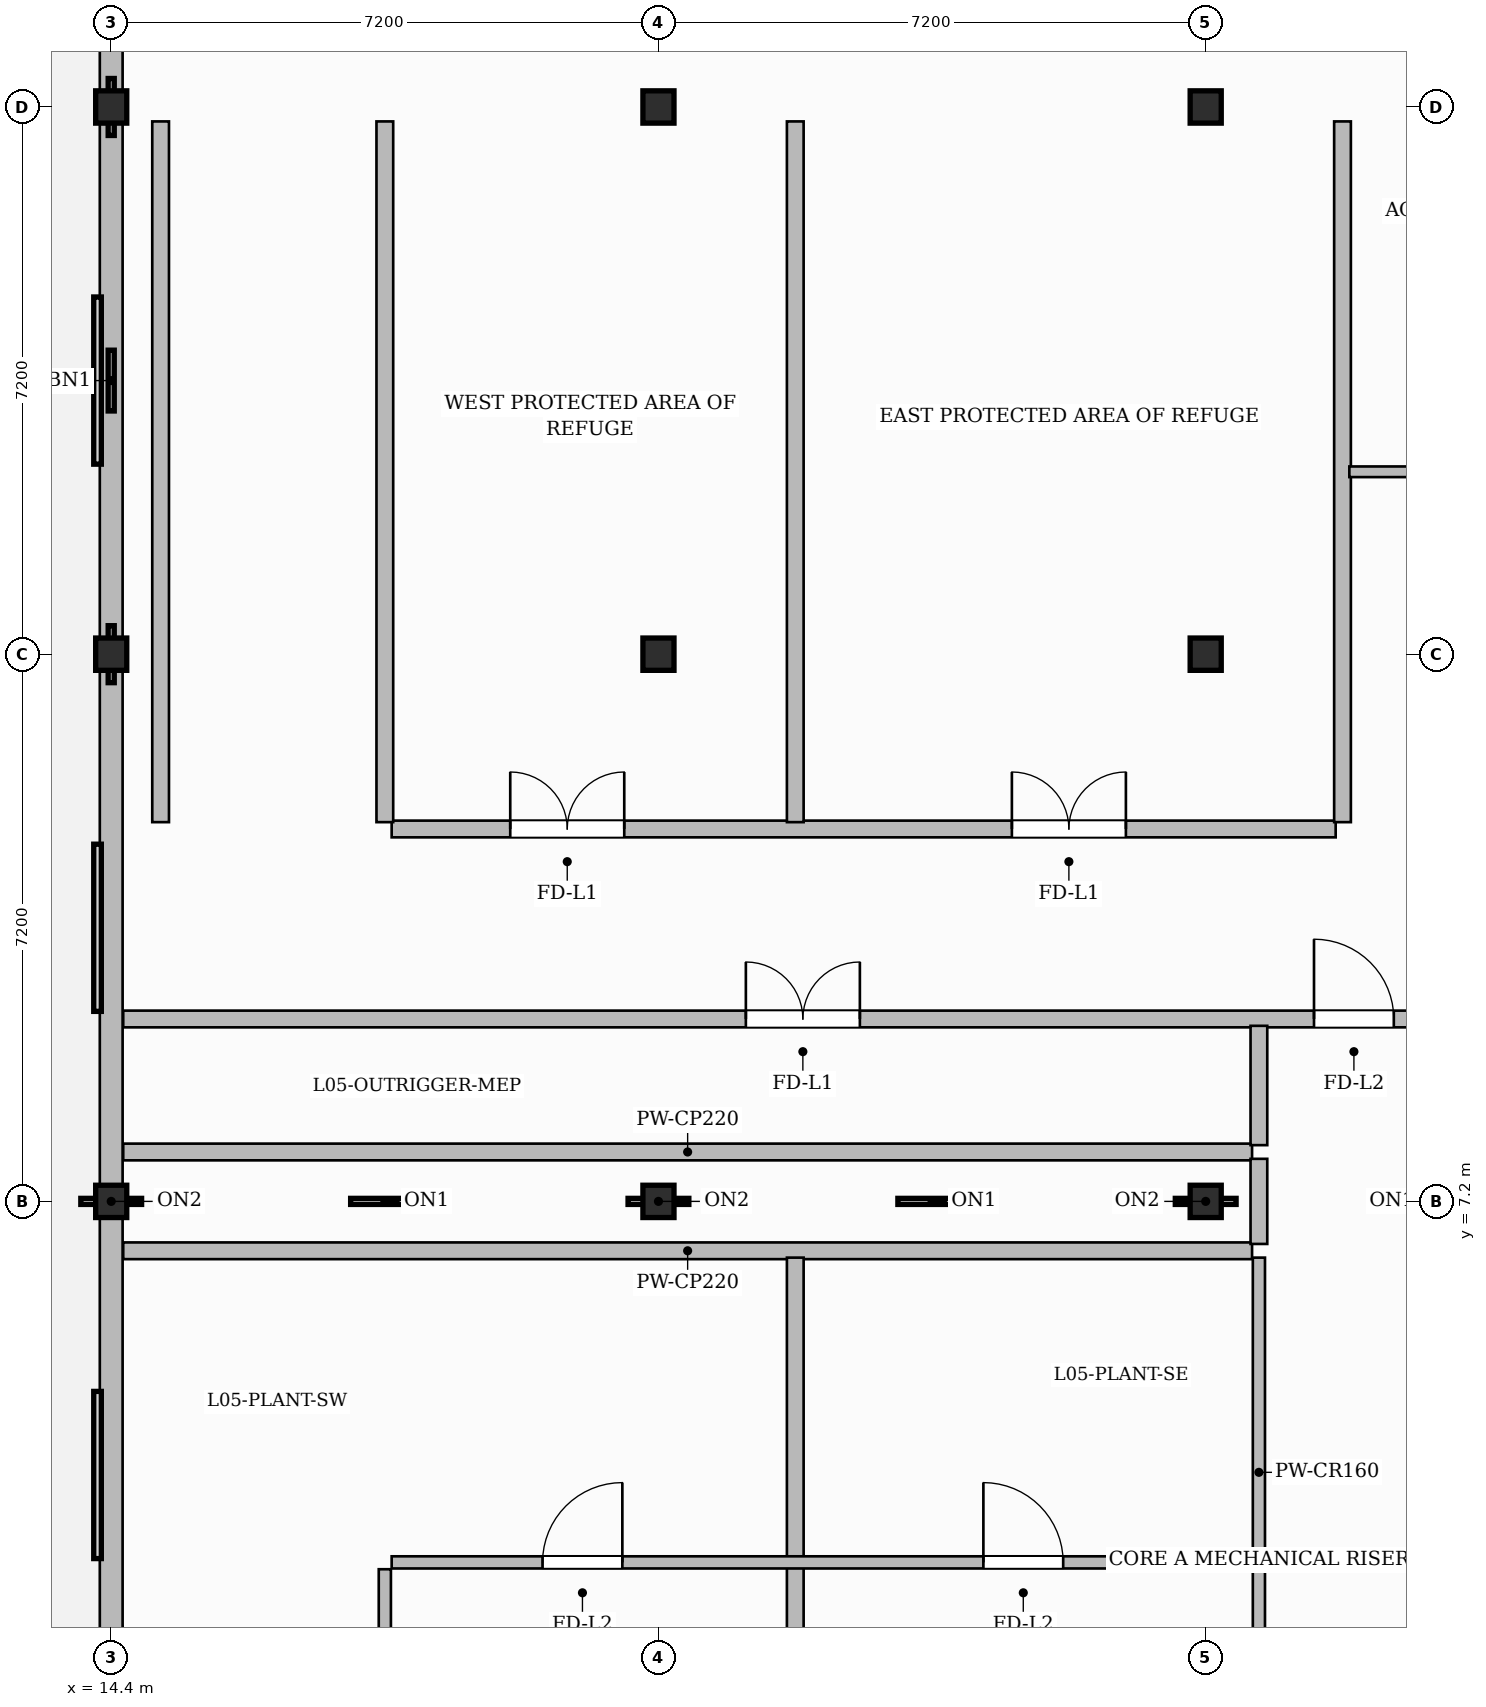
"""IFC4 building model, lengths in metres.
Left out: names, types, materials, properties, quantities, classifications, styles, units other than length and angle.
Written with IfcOpenShell. Run it as: python <this file> out.ifc"""

import sys

from ifc_helpers import new_model, si_unit, direction, frame, frame_2d, origin, origin_2d, place, context, subcontext, project, spatial, rectangle, i_section, extrude, source, transform, mapped, element, fill, save


model = new_model("IFC4")
c1 = context("Model", 3, precision=1e-05, world=origin(), true_north=direction((0.0, 1.0)))
c2 = subcontext(c1, "Body", "Model", "MODEL_VIEW")
j1 = project(units=[si_unit("LENGTHUNIT", "METRE"), si_unit("PLANEANGLEUNIT", "RADIAN")], contexts=[c1])
p1 = place(None, origin())
s1 = spatial("IfcSite", under=j1, at=p1, CompositionType="ELEMENT")
p2 = place(p1, origin())
s2 = spatial("IfcBuilding", under=s1, at=p2, CompositionType="ELEMENT")
p3 = place(p2, frame((0.0, 0.0, 27.0)))
s3 = spatial("IfcBuildingStorey", under=s2, at=p3, CompositionType="ELEMENT", Elevation=27.0)
m1 = source(origin(), c2, "Body", "SweptSolid", [
    extrude(i_section(OverallWidth=0.409, OverallDepth=0.425, WebThickness=0.024, FlangeThickness=0.039, FilletRadius=0.015, at=origin_2d()), origin(), (0.0, 0.0, 1.0), 5.4),
])
for number, where, z_axis, x_axis in (
    (1, (14.4, 7.2, 0.0), (0.0, 0.0, 1.0), (1.0, 0.0, 0.0)),
    (2, (14.4, 14.4, 0.0), (0.0, 0.0, 1.0), (1.0, 0.0, 0.0)),
    (3, (14.4, 21.6, 0.0), (0.0, 0.0, 1.0), (1.0, 0.0, 0.0)),
    (4, (21.6, 7.2, 0.0), (0.0, 0.0, 1.0), (1.0, 0.0, 0.0)),
    (5, (21.6, 14.4, 0.0), (0.0, 0.0, 1.0), (1.0, 0.0, 0.0)),
    (6, (21.6, 21.6, 0.0), (0.0, 0.0, 1.0), (1.0, 0.0, 0.0)),
    (7, (28.8, 7.2, 0.0), (0.0, 0.0, 1.0), (1.0, 0.0, 0.0)),
    (8, (28.8, 14.4, 0.0), (0.0, 0.0, 1.0), (1.0, 0.0, 0.0)),
    (9, (28.8, 21.6, 0.0), (0.0, 0.0, 1.0), (1.0, 0.0, 0.0)),
):
    element("IfcColumn", number, at=place(p3, frame(where, z_axis=z_axis, x_axis=x_axis)), inside=s3, PredefinedType="COLUMN", context=c2, shape_type="MappedRepresentation", body=[
        mapped(m1, transform((0.0, 0.0, 0.0), scale=1.0)),
    ])
for number, where, z_axis, x_axis in (
    (10, (14.558, 6.55, 0.0), (0.0, 0.0, 1.0), (1.0, 0.0, 0.0)),
    (11, (14.558, 7.85, 0.0), (0.0, 0.0, 1.0), (1.0, 0.0, 0.0)),
):
    element("IfcWall", number, at=place(p3, frame(where, z_axis=z_axis, x_axis=x_axis)), inside=s3, PredefinedType="PARTITIONING", context=c2, shape_type="SweptSolid", body=[
        extrude(rectangle(XDim=14.852, YDim=0.22, at=frame_2d((7.426, 0.0))), origin(), (0.0, 0.0, 1.0), 5.15),
    ])
p4 = place(p3, frame((29.5, 6.64, 0.0), z_axis=(0.0, 0.0, 1.0), x_axis=(0.0, 1.0, 0.0)))
e12 = element("IfcWall", 12, at=p4, inside=s3, PredefinedType="PARTITIONING", context=c2, shape_type="SweptSolid", body=[
    extrude(rectangle(XDim=1.12, YDim=0.22, at=frame_2d((0.56, 0.0))), origin(), (0.0, 0.0, 1.0), 5.15),
])
p5 = place(p3, frame((15.05, 12.19, 0.0), z_axis=(0.0, 0.0, 1.0), x_axis=(0.0, 1.0, 0.0)))
e13 = element("IfcWall", 13, at=p5, inside=s3, PredefinedType="PARTITIONING", context=c2, shape_type="SweptSolid", body=[
    extrude(rectangle(XDim=9.22, YDim=0.22, at=frame_2d((4.61, 0.0))), origin(), (0.0, 0.0, 1.0), 5.15),
])
p6 = place(p3, frame((14.558, 9.6, 0.0), z_axis=(0.0, 0.0, 1.0), x_axis=(1.0, 0.0, 0.0)))
e14 = element("IfcWall", 14, at=p6, inside=s3, PredefinedType="PARTITIONING", context=c2, shape_type="SweptSolid", body=[
    extrude(rectangle(XDim=17.372, YDim=0.22, at=frame_2d((8.686, 0.0))), origin(), (0.0, 0.0, 1.0), 5.15),
])
p7 = place(p6, frame((15.667, 0.0, 0.0)))
e15 = element("IfcOpeningElement", 15, at=p7, cuts=e14, PredefinedType="OPENING", context=c2, shape_type="SweptSolid", body=[
    extrude(rectangle(XDim=1.05, YDim=2.15, at=frame_2d((0.525, 1.075))), frame((0.0, 0.12, 0.0), z_axis=(0.0, -1.0, 0.0), x_axis=(1.0, 0.0, 0.0)), (0.0, 0.0, 1.0), 0.24),
])
p8 = place(p6, frame((8.192, 0.0, 0.0)))
e16 = element("IfcOpeningElement", 16, at=p8, cuts=e14, PredefinedType="OPENING", context=c2, shape_type="SweptSolid", body=[
    extrude(rectangle(XDim=1.5, YDim=2.2, at=frame_2d((0.75, 1.1))), frame((0.0, 0.12, 0.0), z_axis=(0.0, -1.0, 0.0), x_axis=(1.0, 0.0, 0.0)), (0.0, 0.0, 1.0), 0.24),
])
p9 = place(p3, frame((18.09, 12.1, 0.0), z_axis=(0.0, 0.0, 1.0), x_axis=(1.0, 0.0, 0.0)))
e17 = element("IfcWall", 17, at=p9, inside=s3, PredefinedType="PARTITIONING", context=c2, shape_type="SweptSolid", body=[
    extrude(rectangle(XDim=12.42, YDim=0.22, at=frame_2d((6.21, 0.0))), origin(), (0.0, 0.0, 1.0), 5.15),
])
p10 = place(p9, frame((1.56, 0.0, 0.0)))
e18 = element("IfcOpeningElement", 18, at=p10, cuts=e17, PredefinedType="OPENING", context=c2, shape_type="SweptSolid", body=[
    extrude(rectangle(XDim=1.5, YDim=2.2, at=frame_2d((0.75, 1.1))), frame((0.0, 0.12, 0.0), z_axis=(0.0, -1.0, 0.0), x_axis=(1.0, 0.0, 0.0)), (0.0, 0.0, 1.0), 0.24),
])
p11 = place(p9, frame((8.16, 0.0, 0.0)))
e19 = element("IfcOpeningElement", 19, at=p11, cuts=e17, PredefinedType="OPENING", context=c2, shape_type="SweptSolid", body=[
    extrude(rectangle(XDim=1.5, YDim=2.2, at=frame_2d((0.75, 1.1))), frame((0.0, 0.12, 0.0), z_axis=(0.0, -1.0, 0.0), x_axis=(1.0, 0.0, 0.0)), (0.0, 0.0, 1.0), 0.24),
])
p12 = place(p3, frame((23.4, 0.81, 0.0), z_axis=(0.0, 0.0, 1.0), x_axis=(0.0, 1.0, 0.0)))
e20 = element("IfcWall", 20, at=p12, inside=s3, PredefinedType="PARTITIONING", context=c2, shape_type="SweptSolid", body=[
    extrude(rectangle(XDim=5.65, YDim=0.22, at=frame_2d((2.825, 0.0))), origin(), (0.0, 0.0, 1.0), 5.15),
])
p13 = place(p3, frame((29.5, 0.81, 0.0), z_axis=(0.0, 0.0, 1.0), x_axis=(0.0, 1.0, 0.0)))
e21 = element("IfcWall", 21, at=p13, inside=s3, PredefinedType="PARTITIONING", context=c2, shape_type="SweptSolid", body=[
    extrude(rectangle(XDim=5.65, YDim=0.16, at=frame_2d((2.825, 0.0))), origin(), (0.0, 0.0, 1.0), 5.15),
])
p14 = place(p3, frame((29.5, 7.94, 0.0), z_axis=(0.0, 0.0, 1.0), x_axis=(0.0, 1.0, 0.0)))
e22 = element("IfcWall", 22, at=p14, inside=s3, PredefinedType="PARTITIONING", context=c2, shape_type="SweptSolid", body=[
    extrude(rectangle(XDim=1.57, YDim=0.22, at=frame_2d((0.785, 0.0))), origin(), (0.0, 0.0, 1.0), 5.15),
])
p15 = place(p3, frame((18.09, 2.45, 0.0), z_axis=(0.0, 0.0, 1.0), x_axis=(1.0, 0.0, 0.0)))
e23 = element("IfcWall", 23, at=p15, inside=s3, PredefinedType="PARTITIONING", context=c2, shape_type="SweptSolid", body=[
    extrude(rectangle(XDim=11.32, YDim=0.16, at=frame_2d((5.66, 0.0))), origin(), (0.0, 0.0, 1.0), 5.15),
])
p16 = place(p15, frame((1.985, 0.0, 0.0)))
e24 = element("IfcOpeningElement", 24, at=p16, cuts=e23, PredefinedType="OPENING", context=c2, shape_type="SweptSolid", body=[
    extrude(rectangle(XDim=1.05, YDim=2.15, at=frame_2d((0.525, 1.075))), frame((0.0, 0.09, 0.0), z_axis=(0.0, -1.0, 0.0), x_axis=(1.0, 0.0, 0.0)), (0.0, 0.0, 1.0), 0.18),
])
p17 = place(p15, frame((7.785, 0.0, 0.0)))
e25 = element("IfcOpeningElement", 25, at=p17, cuts=e23, PredefinedType="OPENING", context=c2, shape_type="SweptSolid", body=[
    extrude(rectangle(XDim=1.05, YDim=2.15, at=frame_2d((0.525, 1.075))), frame((0.0, 0.09, 0.0), z_axis=(0.0, -1.0, 0.0), x_axis=(1.0, 0.0, 0.0)), (0.0, 0.0, 1.0), 0.18),
])
p18 = place(p3, frame((18.0, 0.81, 0.0), z_axis=(0.0, 0.0, 1.0), x_axis=(0.0, 1.0, 0.0)))
e26 = element("IfcWall", 26, at=p18, inside=s3, PredefinedType="PARTITIONING", context=c2, shape_type="SweptSolid", body=[
    extrude(rectangle(XDim=1.55, YDim=0.16, at=frame_2d((0.775, 0.0))), origin(), (0.0, 0.0, 1.0), 4.685),
])
p19 = place(p3, frame((18.0, 12.19, 0.0), z_axis=(0.0, 0.0, 1.0), x_axis=(0.0, 1.0, 0.0)))
e27 = element("IfcWall", 27, at=p19, inside=s3, PredefinedType="PARTITIONING", context=c2, shape_type="SweptSolid", body=[
    extrude(rectangle(XDim=9.22, YDim=0.22, at=frame_2d((4.61, 0.0))), origin(), (0.0, 0.0, 1.0), 4.685),
])
for number, where, z_axis, x_axis in (
    (28, (23.4, 12.19, 0.0), (0.0, 0.0, 1.0), (0.0, 1.0, 0.0)),
    (29, (30.6, 12.19, 0.0), (0.0, 0.0, 1.0), (0.0, 1.0, 0.0)),
):
    element("IfcWall", number, at=place(p3, frame(where, z_axis=z_axis, x_axis=x_axis)), inside=s3, PredefinedType="PARTITIONING", context=c2, shape_type="SweptSolid", body=[
        extrude(rectangle(XDim=9.22, YDim=0.22, at=frame_2d((4.61, 0.0))), origin(), (0.0, 0.0, 1.0), 5.15),
    ])
p20 = place(p3, frame((30.69, 16.8, 0.0), z_axis=(0.0, 0.0, 1.0), x_axis=(1.0, 0.0, 0.0)))
e30 = element("IfcWall", 30, at=p20, inside=s3, PredefinedType="PARTITIONING", context=c2, shape_type="SweptSolid", body=[
    extrude(rectangle(XDim=3.92, YDim=0.14, at=frame_2d((1.96, 0.0))), origin(), (0.0, 0.0, 1.0), 5.15),
])
p21 = place(p20, frame((1.535, 0.0, 0.0)))
e31 = element("IfcOpeningElement", 31, at=p21, cuts=e30, PredefinedType="OPENING", context=c2, shape_type="SweptSolid", body=[
    extrude(rectangle(XDim=0.85, YDim=2.1, at=frame_2d((0.425, 1.05))), frame((0.0, 0.08, 0.0), z_axis=(0.0, -1.0, 0.0), x_axis=(1.0, 0.0, 0.0)), (0.0, 0.0, 1.0), 0.16),
])
p22 = place(p3, frame((14.4, 0.05, 0.0), z_axis=(0.0, 0.0, 1.0), x_axis=(0.0, 1.0, 0.0)))
e32 = element("IfcWall", 32, at=p22, inside=s3, PredefinedType="SOLIDWALL", context=c2, shape_type="SweptSolid", body=[
    extrude(rectangle(XDim=25.1, YDim=0.3, at=frame_2d((12.55, 0.0))), origin(), (0.0, 0.0, 1.0), 4.485),
])
m2 = source(origin(), c2, "Body", "SweptSolid", [
    extrude(rectangle(XDim=1.05, YDim=2.15, at=frame_2d((0.525, 1.075))), frame((0.0, 0.025, 0.0), z_axis=(0.0, -1.0, 0.0), x_axis=(1.0, 0.0, 0.0)), (0.0, 0.0, 1.0), 0.05),
])
p23 = place(p7, origin())
e33 = element("IfcDoor", 33, at=p23, inside=s3, OperationType="SINGLE_SWING_LEFT", PredefinedType="DOOR", context=c2, shape_type="MappedRepresentation", body=[
    mapped(m2, transform((0.0, 0.0, 0.0), scale=1.0)),
])
fill(e15, e33)
m3 = source(origin(), c2, "Body", "SweptSolid", [
    extrude(rectangle(XDim=1.5, YDim=2.2, at=frame_2d((0.75, 1.1))), frame((0.0, 0.025, 0.0), z_axis=(0.0, -1.0, 0.0), x_axis=(1.0, 0.0, 0.0)), (0.0, 0.0, 1.0), 0.05),
])
p24 = place(p8, origin())
e34 = element("IfcDoor", 34, at=p24, inside=s3, OperationType="DOUBLE_DOOR_SINGLE_SWING", PredefinedType="DOOR", context=c2, shape_type="MappedRepresentation", body=[
    mapped(m3, transform((0.0, 0.0, 0.0), scale=1.0)),
])
fill(e16, e34)
p25 = place(p16, origin())
e35 = element("IfcDoor", 35, at=p25, inside=s3, OperationType="SINGLE_SWING_RIGHT", PredefinedType="DOOR", context=c2, shape_type="MappedRepresentation", body=[
    mapped(m2, transform((0.0, 0.0, 0.0), scale=1.0)),
])
fill(e24, e35)
p26 = place(p17, origin())
e36 = element("IfcDoor", 36, at=p26, inside=s3, OperationType="SINGLE_SWING_LEFT", PredefinedType="DOOR", context=c2, shape_type="MappedRepresentation", body=[
    mapped(m2, transform((0.0, 0.0, 0.0), scale=1.0)),
])
fill(e25, e36)
p27 = place(p10, origin())
e37 = element("IfcDoor", 37, at=p27, inside=s3, OperationType="DOUBLE_DOOR_SINGLE_SWING", PredefinedType="DOOR", context=c2, shape_type="MappedRepresentation", body=[
    mapped(m3, transform((0.0, 0.0, 0.0), scale=1.0)),
])
fill(e18, e37)
p28 = place(p11, origin())
e38 = element("IfcDoor", 38, at=p28, inside=s3, OperationType="DOUBLE_DOOR_SINGLE_SWING", PredefinedType="DOOR", context=c2, shape_type="MappedRepresentation", body=[
    mapped(m3, transform((0.0, 0.0, 0.0), scale=1.0)),
])
fill(e19, e38)
save(model, sys.argv[1])
